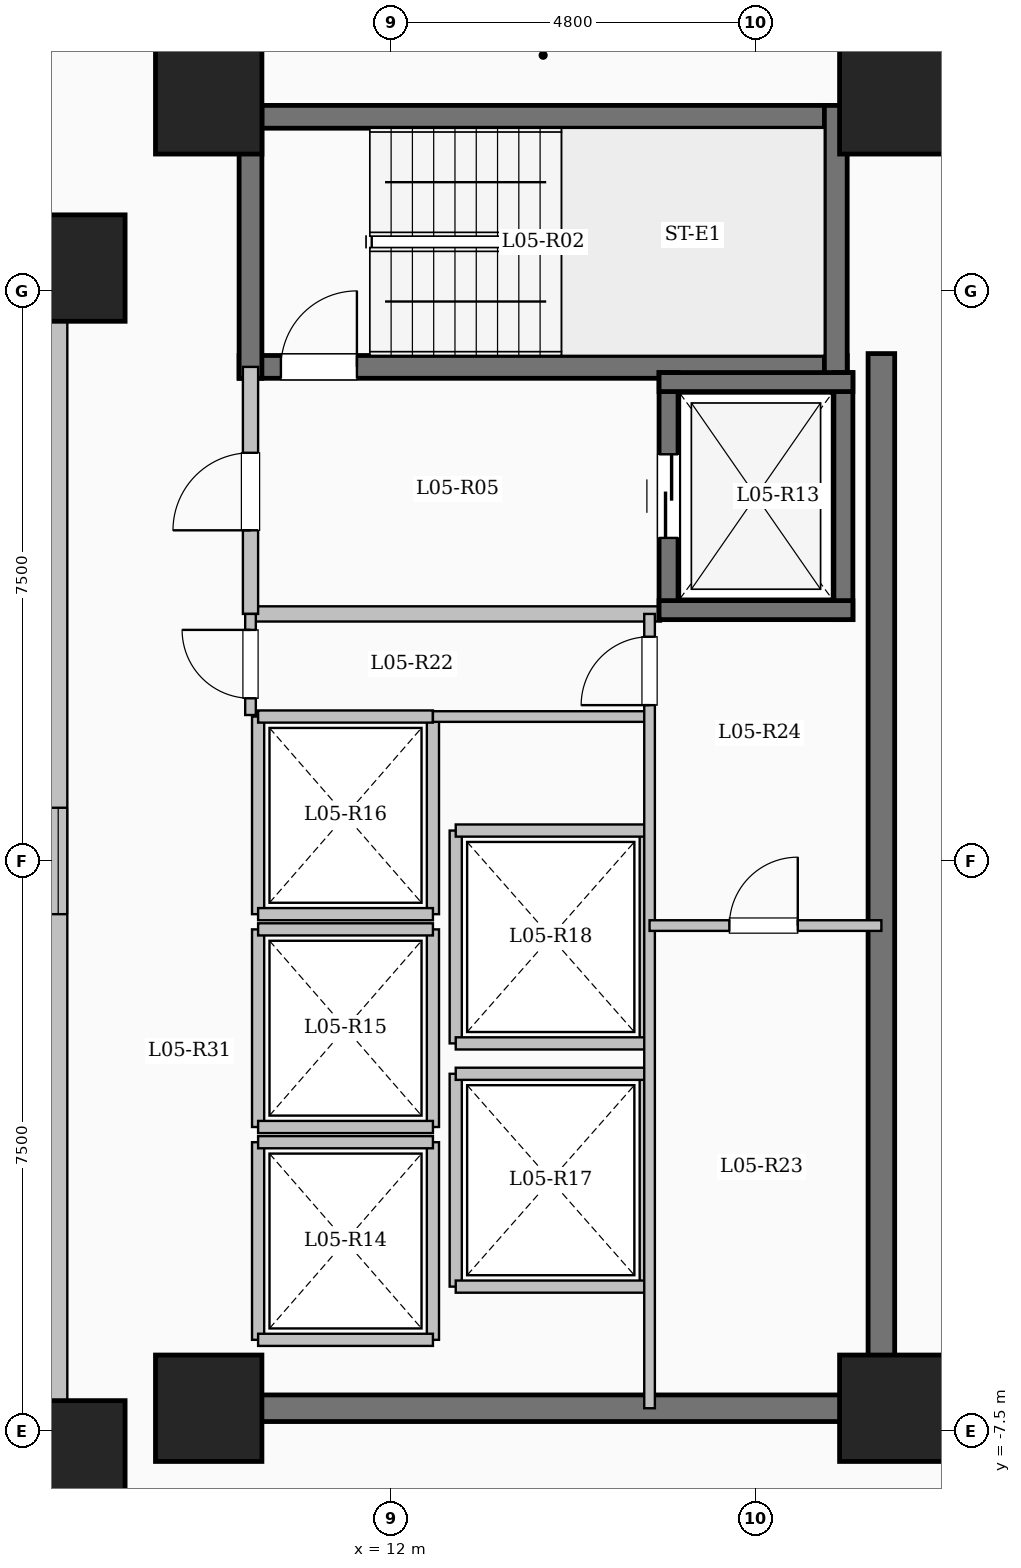
"""IFC4 building model, lengths in metres.
Left out: names, types, materials, properties, quantities, classifications, styles, units other than length and angle.
Written with IfcOpenShell. Run it as: python <this file> out.ifc"""

import sys

from ifc_helpers import new_model, si_unit, direction, frame, frame_2d, origin, origin_2d, place, context, subcontext, project, spatial, rectangle, extrude, element, fill, save


model = new_model("IFC4")
c1 = context("Model", 3, precision=1e-05, world=origin(), true_north=direction((0.0, 1.0)))
c2 = subcontext(c1, "Body", "Model", "MODEL_VIEW")
j1 = project(units=[si_unit("LENGTHUNIT", "METRE"), si_unit("PLANEANGLEUNIT", "RADIAN")], contexts=[c1])
p1 = place(None, origin())
s1 = spatial("IfcSite", under=j1, at=p1, CompositionType="ELEMENT")
p2 = place(p1, origin())
s2 = spatial("IfcBuilding", under=s1, at=p2, CompositionType="ELEMENT")
p3 = place(p2, frame((0.0, 0.0, 24.0)))
s3 = spatial("IfcBuildingStorey", under=s2, at=p3, CompositionType="ELEMENT", Elevation=24.0)
for number, where, z_axis, x_axis in (
    (1, (7.8, -7.8, 0.0), (0.0, 0.0, 1.0), (1.0, 0.0, 0.0)),
    (2, (7.8, 7.8, 0.0), (0.0, 0.0, 1.0), (1.0, 0.0, 0.0)),
    (3, (9.6, -7.2, 0.0), (0.0, 0.0, 1.0), (1.0, 0.0, 0.0)),
    (4, (9.6, 10.0, 0.0), (0.0, 0.0, 1.0), (1.0, 0.0, 0.0)),
    (5, (18.6, -7.2, 0.0), (0.0, 0.0, 1.0), (1.0, 0.0, 0.0)),
    (6, (18.6, 10.0, 0.0), (0.0, 0.0, 1.0), (1.0, 0.0, 0.0)),
):
    element("IfcColumn", number, at=place(p3, frame(where, z_axis=z_axis, x_axis=x_axis)), inside=s3, PredefinedType="COLUMN", context=c2, shape_type="SweptSolid", body=[
        extrude(rectangle(XDim=1.4, YDim=1.4, at=origin_2d()), origin(), (0.0, 0.0, 1.0), 3.35),
    ])
p4 = place(p3, frame((-7.62, -7.62, 0.0), z_axis=(0.0, 0.0, 1.0), x_axis=(1.0, 0.0, 0.0)))
e7 = element("IfcWall", 7, at=p4, inside=s3, PredefinedType="SOLIDWALL", context=c2, shape_type="SweptSolid", body=[
    extrude(rectangle(XDim=15.24, YDim=0.24, at=frame_2d((7.62, 0.0))), origin(), (0.0, 0.0, 1.0), 3.1),
])
p5 = place(p4, frame((6.92, 0.0, 0.95)))
e8 = element("IfcOpeningElement", 8, at=p5, cuts=e7, PredefinedType="OPENING", context=c2, shape_type="SweptSolid", body=[
    extrude(rectangle(XDim=1.4, YDim=1.5, at=frame_2d((0.7, 0.75))), frame((0.0, 0.13, 0.0), z_axis=(0.0, -1.0, 0.0), x_axis=(1.0, 0.0, 0.0)), (0.0, 0.0, 1.0), 0.26),
])
p6 = place(p3, frame((7.62, -7.62, 0.0), z_axis=(0.0, 0.0, 1.0), x_axis=(0.0, 1.0, 0.0)))
e9 = element("IfcWall", 9, at=p6, inside=s3, PredefinedType="SOLIDWALL", context=c2, shape_type="SweptSolid", body=[
    extrude(rectangle(XDim=15.24, YDim=0.24, at=frame_2d((7.62, 0.0))), origin(), (0.0, 0.0, 1.0), 3.1),
])
p7 = place(p6, frame((6.92, 0.0, 0.95)))
e10 = element("IfcOpeningElement", 10, at=p7, cuts=e9, PredefinedType="OPENING", context=c2, shape_type="SweptSolid", body=[
    extrude(rectangle(XDim=1.4, YDim=1.5, at=frame_2d((0.7, 0.75))), frame((0.0, 0.13, 0.0), z_axis=(0.0, -1.0, 0.0), x_axis=(1.0, 0.0, 0.0)), (0.0, 0.0, 1.0), 0.26),
])
p8 = place(p3, frame((7.62, 7.62, 0.0), z_axis=(0.0, 0.0, 1.0), x_axis=(-1.0, 0.0, 0.0)))
e11 = element("IfcWall", 11, at=p8, inside=s3, PredefinedType="SOLIDWALL", context=c2, shape_type="SweptSolid", body=[
    extrude(rectangle(XDim=15.24, YDim=0.24, at=frame_2d((7.62, 0.0))), origin(), (0.0, 0.0, 1.0), 3.1),
])
p9 = place(p8, frame((6.92, 0.0, 0.95)))
e12 = element("IfcOpeningElement", 12, at=p9, cuts=e11, PredefinedType="OPENING", context=c2, shape_type="SweptSolid", body=[
    extrude(rectangle(XDim=1.4, YDim=1.5, at=frame_2d((0.7, 0.75))), frame((0.0, 0.13, 0.0), z_axis=(0.0, -1.0, 0.0), x_axis=(1.0, 0.0, 0.0)), (0.0, 0.0, 1.0), 0.26),
])
p10 = place(p3, frame((10.0, 9.79, 0.0), z_axis=(0.0, 0.0, 1.0), x_axis=(1.0, 0.0, 0.0)))
e13 = element("IfcWall", 13, at=p10, inside=s3, PredefinedType="SHEAR", context=c2, shape_type="SweptSolid", body=[
    extrude(rectangle(XDim=8.0, YDim=0.3, at=frame_2d((4.0, 0.0))), origin(), (0.0, 0.0, 1.0), 3.35),
])
p11 = place(p3, frame((10.0, 6.5, 0.0), z_axis=(0.0, 0.0, 1.0), x_axis=(1.0, 0.0, 0.0)))
e14 = element("IfcWall", 14, at=p11, inside=s3, PredefinedType="SHEAR", context=c2, shape_type="SweptSolid", body=[
    extrude(rectangle(XDim=8.0, YDim=0.3, at=frame_2d((4.0, 0.0))), origin(), (0.0, 0.0, 1.0), 3.35),
])
p12 = place(p11, frame((0.55, 0.0, 0.0)))
e15 = element("IfcOpeningElement", 15, at=p12, cuts=e14, PredefinedType="OPENING", context=c2, shape_type="SweptSolid", body=[
    extrude(rectangle(XDim=1.0, YDim=2.15, at=frame_2d((0.5, 1.075))), frame((0.0, 0.16, 0.0), z_axis=(0.0, -1.0, 0.0), x_axis=(1.0, 0.0, 0.0)), (0.0, 0.0, 1.0), 0.32),
])
for number, where, z_axis, x_axis in (
    (16, (10.15, 6.35, 0.0), (0.0, 0.0, 1.0), (0.0, 1.0, 0.0)),
    (17, (17.85, 6.35, 0.0), (0.0, 0.0, 1.0), (0.0, 1.0, 0.0)),
):
    element("IfcWall", number, at=place(p3, frame(where, z_axis=z_axis, x_axis=x_axis)), inside=s3, PredefinedType="SHEAR", context=c2, shape_type="SweptSolid", body=[
        extrude(rectangle(XDim=3.59, YDim=0.3, at=frame_2d((1.795, 0.0))), origin(), (0.0, 0.0, 1.0), 3.35),
    ])
p13 = place(p3, frame((10.15, 3.25, 0.0), z_axis=(0.0, 0.0, 1.0), x_axis=(1.0, 0.0, 0.0)))
e18 = element("IfcWall", 18, at=p13, inside=s3, PredefinedType="SOLIDWALL", context=c2, shape_type="SweptSolid", body=[
    extrude(rectangle(XDim=5.4, YDim=0.2, at=frame_2d((2.7, 0.0))), origin(), (0.0, 0.0, 1.0), 3.1),
])
p14 = place(p3, frame((10.15, 3.25, 0.0), z_axis=(0.0, 0.0, 1.0), x_axis=(0.0, 1.0, 0.0)))
e19 = element("IfcWall", 19, at=p14, inside=s3, PredefinedType="SOLIDWALL", context=c2, shape_type="SweptSolid", body=[
    extrude(rectangle(XDim=3.25, YDim=0.2, at=frame_2d((1.625, 0.0))), origin(), (0.0, 0.0, 1.0), 3.1),
])
p15 = place(p14, frame((1.1, 0.0, 0.0)))
e20 = element("IfcOpeningElement", 20, at=p15, cuts=e19, PredefinedType="OPENING", context=c2, shape_type="SweptSolid", body=[
    extrude(rectangle(XDim=1.02, YDim=2.15, at=frame_2d((0.51, 1.075))), frame((0.0, 0.11, 0.0), z_axis=(0.0, -1.0, 0.0), x_axis=(1.0, 0.0, 0.0)), (0.0, 0.0, 1.0), 0.22),
])
p16 = place(p3, frame((15.65, 3.175, 0.0), z_axis=(0.0, 0.0, 1.0), x_axis=(0.0, 1.0, 0.0)))
e21 = element("IfcWall", 21, at=p16, inside=s3, PredefinedType="SHEAR", context=c2, shape_type="SweptSolid", body=[
    extrude(rectangle(XDim=3.25, YDim=0.25, at=frame_2d((1.625, 0.0))), origin(), (0.0, 0.0, 1.0), 3.35),
])
p17 = place(p16, frame((1.075, 0.0, 0.0)))
e22 = element("IfcOpeningElement", 22, at=p17, cuts=e21, PredefinedType="OPENING", context=c2, shape_type="SweptSolid", body=[
    extrude(rectangle(XDim=1.1, YDim=2.15, at=frame_2d((0.55, 1.075))), frame((0.0, 0.135, 0.0), z_axis=(0.0, -1.0, 0.0), x_axis=(1.0, 0.0, 0.0)), (0.0, 0.0, 1.0), 0.27),
])
p18 = place(p3, frame((17.95, 3.175, 0.0), z_axis=(0.0, 0.0, 1.0), x_axis=(0.0, 1.0, 0.0)))
e23 = element("IfcWall", 23, at=p18, inside=s3, PredefinedType="SHEAR", context=c2, shape_type="SweptSolid", body=[
    extrude(rectangle(XDim=3.25, YDim=0.25, at=frame_2d((1.625, 0.0))), origin(), (0.0, 0.0, 1.0), 3.35),
])
for number, where, z_axis, x_axis in (
    (24, (15.525, 3.3, 0.0), (0.0, 0.0, 1.0), (1.0, 0.0, 0.0)),
    (25, (15.525, 6.3, 0.0), (0.0, 0.0, 1.0), (1.0, 0.0, 0.0)),
):
    element("IfcWall", number, at=place(p3, frame(where, z_axis=z_axis, x_axis=x_axis)), inside=s3, PredefinedType="SHEAR", context=c2, shape_type="SweptSolid", body=[
        extrude(rectangle(XDim=2.55, YDim=0.25, at=frame_2d((1.275, 0.0))), origin(), (0.0, 0.0, 1.0), 3.35),
    ])
for number, where, z_axis, x_axis in (
    (26, (10.25, -6.3, 0.0), (0.0, 0.0, 1.0), (0.0, 1.0, 0.0)),
    (27, (12.55, -6.3, 0.0), (0.0, 0.0, 1.0), (0.0, 1.0, 0.0)),
):
    element("IfcWall", number, at=place(p3, frame(where, z_axis=z_axis, x_axis=x_axis)), inside=s3, PredefinedType="SOLIDWALL", context=c2, shape_type="SweptSolid", body=[
        extrude(rectangle(XDim=2.6, YDim=0.16, at=frame_2d((1.3, 0.0))), origin(), (0.0, 0.0, 1.0), 3.1),
    ])
for number, where, z_axis, x_axis in (
    (28, (10.25, -6.3, 0.0), (0.0, 0.0, 1.0), (1.0, 0.0, 0.0)),
    (29, (10.25, -3.7, 0.0), (0.0, 0.0, 1.0), (1.0, 0.0, 0.0)),
):
    element("IfcWall", number, at=place(p3, frame(where, z_axis=z_axis, x_axis=x_axis)), inside=s3, PredefinedType="SOLIDWALL", context=c2, shape_type="SweptSolid", body=[
        extrude(rectangle(XDim=2.3, YDim=0.16, at=frame_2d((1.15, 0.0))), origin(), (0.0, 0.0, 1.0), 3.1),
    ])
for number, where, z_axis, x_axis in (
    (30, (10.25, -3.5, 0.0), (0.0, 0.0, 1.0), (0.0, 1.0, 0.0)),
    (31, (12.55, -3.5, 0.0), (0.0, 0.0, 1.0), (0.0, 1.0, 0.0)),
):
    element("IfcWall", number, at=place(p3, frame(where, z_axis=z_axis, x_axis=x_axis)), inside=s3, PredefinedType="SOLIDWALL", context=c2, shape_type="SweptSolid", body=[
        extrude(rectangle(XDim=2.6, YDim=0.16, at=frame_2d((1.3, 0.0))), origin(), (0.0, 0.0, 1.0), 3.1),
    ])
for number, where, z_axis, x_axis in (
    (32, (10.25, -3.5, 0.0), (0.0, 0.0, 1.0), (1.0, 0.0, 0.0)),
    (33, (10.25, -0.9, 0.0), (0.0, 0.0, 1.0), (1.0, 0.0, 0.0)),
):
    element("IfcWall", number, at=place(p3, frame(where, z_axis=z_axis, x_axis=x_axis)), inside=s3, PredefinedType="SOLIDWALL", context=c2, shape_type="SweptSolid", body=[
        extrude(rectangle(XDim=2.3, YDim=0.16, at=frame_2d((1.15, 0.0))), origin(), (0.0, 0.0, 1.0), 3.1),
    ])
for number, where, z_axis, x_axis in (
    (34, (10.25, -0.7, 0.0), (0.0, 0.0, 1.0), (0.0, 1.0, 0.0)),
    (35, (12.55, -0.7, 0.0), (0.0, 0.0, 1.0), (0.0, 1.0, 0.0)),
):
    element("IfcWall", number, at=place(p3, frame(where, z_axis=z_axis, x_axis=x_axis)), inside=s3, PredefinedType="SOLIDWALL", context=c2, shape_type="SweptSolid", body=[
        extrude(rectangle(XDim=2.6, YDim=0.16, at=frame_2d((1.3, 0.0))), origin(), (0.0, 0.0, 1.0), 3.1),
    ])
for number, where, z_axis, x_axis in (
    (36, (10.25, -0.7, 0.0), (0.0, 0.0, 1.0), (1.0, 0.0, 0.0)),
    (37, (10.25, 1.9, 0.0), (0.0, 0.0, 1.0), (1.0, 0.0, 0.0)),
):
    element("IfcWall", number, at=place(p3, frame(where, z_axis=z_axis, x_axis=x_axis)), inside=s3, PredefinedType="SOLIDWALL", context=c2, shape_type="SweptSolid", body=[
        extrude(rectangle(XDim=2.3, YDim=0.16, at=frame_2d((1.15, 0.0))), origin(), (0.0, 0.0, 1.0), 3.1),
    ])
for number, where, z_axis, x_axis in (
    (38, (12.85, -5.6, 0.0), (0.0, 0.0, 1.0), (0.0, 1.0, 0.0)),
    (39, (15.35, -5.6, 0.0), (0.0, 0.0, 1.0), (0.0, 1.0, 0.0)),
):
    element("IfcWall", number, at=place(p3, frame(where, z_axis=z_axis, x_axis=x_axis)), inside=s3, PredefinedType="SOLIDWALL", context=c2, shape_type="SweptSolid", body=[
        extrude(rectangle(XDim=2.8, YDim=0.16, at=frame_2d((1.4, 0.0))), origin(), (0.0, 0.0, 1.0), 3.1),
    ])
for number, where, z_axis, x_axis in (
    (40, (12.85, -5.6, 0.0), (0.0, 0.0, 1.0), (1.0, 0.0, 0.0)),
    (41, (12.85, -2.8, 0.0), (0.0, 0.0, 1.0), (1.0, 0.0, 0.0)),
):
    element("IfcWall", number, at=place(p3, frame(where, z_axis=z_axis, x_axis=x_axis)), inside=s3, PredefinedType="SOLIDWALL", context=c2, shape_type="SweptSolid", body=[
        extrude(rectangle(XDim=2.5, YDim=0.16, at=frame_2d((1.25, 0.0))), origin(), (0.0, 0.0, 1.0), 3.1),
    ])
for number, where, z_axis, x_axis in (
    (42, (12.85, -2.4, 0.0), (0.0, 0.0, 1.0), (0.0, 1.0, 0.0)),
    (43, (15.35, -2.4, 0.0), (0.0, 0.0, 1.0), (0.0, 1.0, 0.0)),
):
    element("IfcWall", number, at=place(p3, frame(where, z_axis=z_axis, x_axis=x_axis)), inside=s3, PredefinedType="SOLIDWALL", context=c2, shape_type="SweptSolid", body=[
        extrude(rectangle(XDim=2.8, YDim=0.16, at=frame_2d((1.4, 0.0))), origin(), (0.0, 0.0, 1.0), 3.1),
    ])
for number, where, z_axis, x_axis in (
    (44, (12.85, -2.4, 0.0), (0.0, 0.0, 1.0), (1.0, 0.0, 0.0)),
    (45, (12.85, 0.4, 0.0), (0.0, 0.0, 1.0), (1.0, 0.0, 0.0)),
):
    element("IfcWall", number, at=place(p3, frame(where, z_axis=z_axis, x_axis=x_axis)), inside=s3, PredefinedType="SOLIDWALL", context=c2, shape_type="SweptSolid", body=[
        extrude(rectangle(XDim=2.5, YDim=0.16, at=frame_2d((1.25, 0.0))), origin(), (0.0, 0.0, 1.0), 3.1),
    ])
p19 = place(p3, frame((18.45, -7.375, 0.0), z_axis=(0.0, 0.0, 1.0), x_axis=(0.0, 1.0, 0.0)))
e46 = element("IfcWall", 46, at=p19, inside=s3, PredefinedType="SHEAR", context=c2, shape_type="SweptSolid", body=[
    extrude(rectangle(XDim=14.05, YDim=0.35, at=frame_2d((7.025, 0.0))), origin(), (0.0, 0.0, 1.0), 3.35),
])
p20 = place(p3, frame((10.075, -7.2, 0.0), z_axis=(0.0, 0.0, 1.0), x_axis=(1.0, 0.0, 0.0)))
e47 = element("IfcWall", 47, at=p20, inside=s3, PredefinedType="SHEAR", context=c2, shape_type="SweptSolid", body=[
    extrude(rectangle(XDim=8.55, YDim=0.35, at=frame_2d((4.275, 0.0))), origin(), (0.0, 0.0, 1.0), 3.35),
])
p21 = place(p3, frame((12.55, 1.9, 0.0), z_axis=(0.0, 0.0, 1.0), x_axis=(1.0, 0.0, 0.0)))
e48 = element("IfcWall", 48, at=p21, inside=s3, PredefinedType="PARTITIONING", context=c2, shape_type="SweptSolid", body=[
    extrude(rectangle(XDim=2.85, YDim=0.14, at=frame_2d((1.425, 0.0))), origin(), (0.0, 0.0, 1.0), 3.1),
])
p22 = place(p3, frame((10.15, 1.92, 0.0), z_axis=(0.0, 0.0, 1.0), x_axis=(0.0, 1.0, 0.0)))
e49 = element("IfcWall", 49, at=p22, inside=s3, PredefinedType="PARTITIONING", context=c2, shape_type="SweptSolid", body=[
    extrude(rectangle(XDim=1.33, YDim=0.14, at=frame_2d((0.665, 0.0))), origin(), (0.0, 0.0, 1.0), 3.1),
])
p23 = place(p22, frame((0.22, 0.0, 0.0)))
e50 = element("IfcOpeningElement", 50, at=p23, cuts=e49, PredefinedType="OPENING", context=c2, shape_type="SweptSolid", body=[
    extrude(rectangle(XDim=0.9, YDim=2.08, at=frame_2d((0.45, 1.04))), frame((0.0, 0.08, 0.0), z_axis=(0.0, -1.0, 0.0), x_axis=(1.0, 0.0, 0.0)), (0.0, 0.0, 1.0), 0.16),
])
p24 = place(p3, frame((15.4, -7.2, 0.0), z_axis=(0.0, 0.0, 1.0), x_axis=(0.0, 1.0, 0.0)))
e51 = element("IfcWall", 51, at=p24, inside=s3, PredefinedType="PARTITIONING", context=c2, shape_type="SweptSolid", body=[
    extrude(rectangle(XDim=10.45, YDim=0.14, at=frame_2d((5.225, 0.0))), origin(), (0.0, 0.0, 1.0), 3.1),
])
p25 = place(p24, frame((9.25, 0.0, 0.0)))
e52 = element("IfcOpeningElement", 52, at=p25, cuts=e51, PredefinedType="OPENING", context=c2, shape_type="SweptSolid", body=[
    extrude(rectangle(XDim=0.9, YDim=2.08, at=frame_2d((0.45, 1.04))), frame((0.0, 0.08, 0.0), z_axis=(0.0, -1.0, 0.0), x_axis=(1.0, 0.0, 0.0)), (0.0, 0.0, 1.0), 0.16),
])
p26 = place(p3, frame((15.4, -0.85, 0.0), z_axis=(0.0, 0.0, 1.0), x_axis=(1.0, 0.0, 0.0)))
e53 = element("IfcWall", 53, at=p26, inside=s3, PredefinedType="PARTITIONING", context=c2, shape_type="SweptSolid", body=[
    extrude(rectangle(XDim=3.05, YDim=0.14, at=frame_2d((1.525, 0.0))), origin(), (0.0, 0.0, 1.0), 3.1),
])
p27 = place(p26, frame((1.05, 0.0, 0.0)))
e54 = element("IfcOpeningElement", 54, at=p27, cuts=e53, PredefinedType="OPENING", context=c2, shape_type="SweptSolid", body=[
    extrude(rectangle(XDim=0.9, YDim=2.08, at=frame_2d((0.45, 1.04))), frame((0.0, 0.08, 0.0), z_axis=(0.0, -1.0, 0.0), x_axis=(1.0, 0.0, 0.0)), (0.0, 0.0, 1.0), 0.16),
])
p28 = place(p7, origin())
e55 = element("IfcWindow", 55, at=p28, inside=s3, PartitioningType="SINGLE_PANEL", PredefinedType="WINDOW", context=c2, shape_type="SweptSolid", body=[
    extrude(rectangle(XDim=1.4, YDim=1.5, at=frame_2d((0.7, 0.75))), frame((0.0, 0.03, 0.0), z_axis=(0.0, -1.0, 0.0), x_axis=(1.0, 0.0, 0.0)), (0.0, 0.0, 1.0), 0.06),
])
fill(e10, e55)
p29 = place(p12, origin())
e56 = element("IfcDoor", 56, at=p29, inside=s3, OperationType="SINGLE_SWING_RIGHT", PredefinedType="DOOR", context=c2, shape_type="SweptSolid", body=[
    extrude(rectangle(XDim=1.0, YDim=2.15, at=frame_2d((0.5, 1.075))), frame((0.0, 0.025, 0.0), z_axis=(0.0, -1.0, 0.0), x_axis=(1.0, 0.0, 0.0)), (0.0, 0.0, 1.0), 0.05),
])
fill(e15, e56)
p30 = place(p15, origin())
e57 = element("IfcDoor", 57, at=p30, inside=s3, OperationType="SINGLE_SWING_LEFT", PredefinedType="DOOR", context=c2, shape_type="SweptSolid", body=[
    extrude(rectangle(XDim=1.02, YDim=2.15, at=frame_2d((0.51, 1.075))), frame((0.0, 0.025, 0.0), z_axis=(0.0, -1.0, 0.0), x_axis=(1.0, 0.0, 0.0)), (0.0, 0.0, 1.0), 0.05),
])
fill(e20, e57)
p31 = place(p17, origin())
e58 = element("IfcDoor", 58, at=p31, inside=s3, OperationType="SLIDING_TO_LEFT", PredefinedType="DOOR", context=c2, shape_type="SweptSolid", body=[
    extrude(rectangle(XDim=1.1, YDim=2.15, at=frame_2d((0.55, 1.075))), frame((0.0, 0.025, 0.0), z_axis=(0.0, -1.0, 0.0), x_axis=(1.0, 0.0, 0.0)), (0.0, 0.0, 1.0), 0.05),
])
fill(e22, e58)
p32 = place(p23, origin())
e59 = element("IfcDoor", 59, at=p32, inside=s3, OperationType="SINGLE_SWING_RIGHT", PredefinedType="DOOR", context=c2, shape_type="SweptSolid", body=[
    extrude(rectangle(XDim=0.9, YDim=2.08, at=frame_2d((0.45, 1.04))), frame((0.0, 0.025, 0.0), z_axis=(0.0, -1.0, 0.0), x_axis=(1.0, 0.0, 0.0)), (0.0, 0.0, 1.0), 0.05),
])
fill(e50, e59)
p33 = place(p25, origin())
e60 = element("IfcDoor", 60, at=p33, inside=s3, OperationType="SINGLE_SWING_LEFT", PredefinedType="DOOR", context=c2, shape_type="SweptSolid", body=[
    extrude(rectangle(XDim=0.9, YDim=2.08, at=frame_2d((0.45, 1.04))), frame((0.0, 0.025, 0.0), z_axis=(0.0, -1.0, 0.0), x_axis=(1.0, 0.0, 0.0)), (0.0, 0.0, 1.0), 0.05),
])
fill(e52, e60)
p34 = place(p27, origin())
e61 = element("IfcDoor", 61, at=p34, inside=s3, OperationType="SINGLE_SWING_RIGHT", PredefinedType="DOOR", context=c2, shape_type="SweptSolid", body=[
    extrude(rectangle(XDim=0.9, YDim=2.08, at=frame_2d((0.45, 1.04))), frame((0.0, 0.025, 0.0), z_axis=(0.0, -1.0, 0.0), x_axis=(1.0, 0.0, 0.0)), (0.0, 0.0, 1.0), 0.05),
])
fill(e54, e61)
save(model, sys.argv[1])
